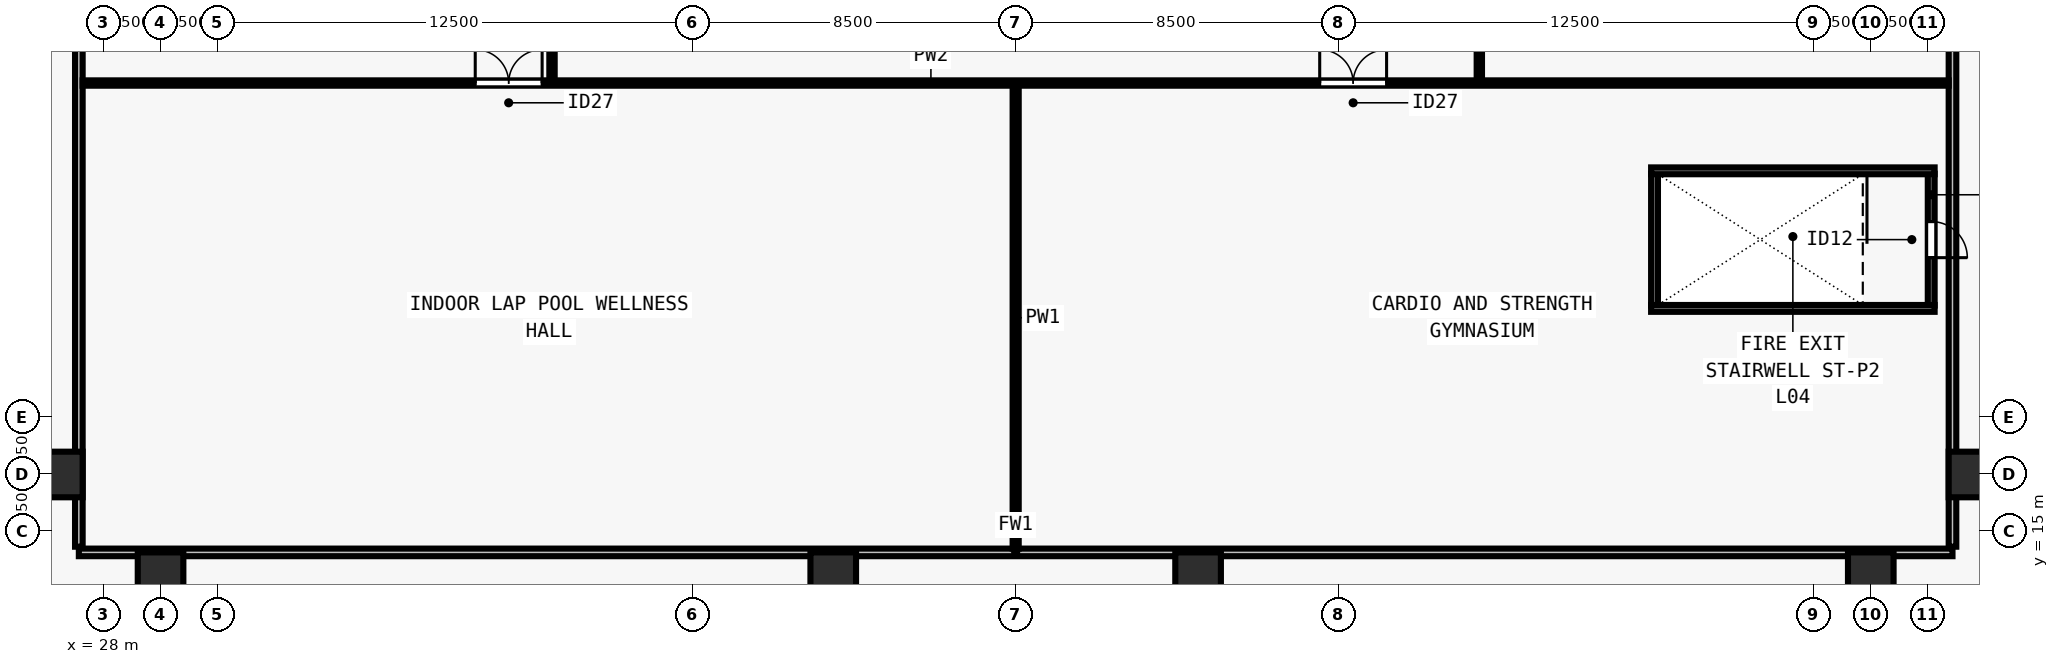
"""IFC4 building model, lengths in metres.
Left out: names, types, materials, properties, quantities, classifications, styles, units other than length and angle.
Written with IfcOpenShell. Run it as: python <this file> out.ifc"""

import sys

from ifc_helpers import new_model, si_unit, direction, frame, frame_2d, origin, origin_2d, place, context, subcontext, project, spatial, rectangle, extrude, element, fill, save


model = new_model("IFC4")
c1 = context("Model", 3, precision=1e-05, world=origin(), true_north=direction((0.0, 1.0)))
c2 = subcontext(c1, "Body", "Model", "MODEL_VIEW")
j1 = project(units=[si_unit("LENGTHUNIT", "METRE"), si_unit("PLANEANGLEUNIT", "RADIAN")], contexts=[c1])
p1 = place(None, origin())
s1 = spatial("IfcSite", under=j1, at=p1, CompositionType="ELEMENT")
p2 = place(p1, origin())
s2 = spatial("IfcBuilding", under=s1, at=p2, CompositionType="ELEMENT")
p3 = place(p2, frame((0.0, 0.0, 19.0)))
s3 = spatial("IfcBuildingStorey", under=s2, at=p3, CompositionType="ELEMENT", Elevation=19.0)
for number, where, z_axis, x_axis in (
    (1, (29.5, 13.85, 0.0), (0.0, 0.0, 1.0), (1.0, 0.0, 0.0)),
    (2, (47.2, 13.85, 0.0), (0.0, 0.0, 1.0), (1.0, 0.0, 0.0)),
    (3, (56.8, 13.85, 0.0), (0.0, 0.0, 1.0), (1.0, 0.0, 0.0)),
    (4, (74.5, 13.85, 0.0), (0.0, 0.0, 1.0), (1.0, 0.0, 0.0)),
    (5, (77.15, 16.5, 0.0), (0.0, 0.0, 1.0), (1.0, 0.0, 0.0)),
    (6, (26.85, 16.5, 0.0), (0.0, 0.0, 1.0), (1.0, 0.0, 0.0)),
):
    element("IfcColumn", number, at=place(p3, frame(where, z_axis=z_axis, x_axis=x_axis)), inside=s3, PredefinedType="COLUMN", context=c2, shape_type="SweptSolid", body=[
        extrude(rectangle(XDim=1.2, YDim=1.2, at=origin_2d()), origin(), (0.0, 0.0, 1.0), 4.5),
    ])
p4 = place(p3, frame((27.35, 14.45, 0.0), z_axis=(0.0, 0.0, 1.0), x_axis=(1.0, 0.0, 0.0)))
e7 = element("IfcWall", 7, at=p4, inside=s3, PredefinedType="SOLIDWALL", context=c2, shape_type="SweptSolid", body=[
    extrude(rectangle(XDim=49.3, YDim=0.2, at=frame_2d((24.65, 0.0))), origin(), (0.0, 0.0, 1.0), 2.455),
])
for number, where, z_axis, x_axis in (
    (8, (27.35, 14.6, 0.0), (0.0, 0.0, 1.0), (0.0, 1.0, 0.0)),
    (9, (76.65, 14.6, 0.0), (0.0, 0.0, 1.0), (0.0, 1.0, 0.0)),
):
    element("IfcWall", number, at=place(p3, frame(where, z_axis=z_axis, x_axis=x_axis)), inside=s3, PredefinedType="SOLIDWALL", context=c2, shape_type="SweptSolid", body=[
        extrude(rectangle(XDim=48.8, YDim=0.2, at=frame_2d((24.4, 0.0))), origin(), (0.0, 0.0, 1.0), 2.455),
    ])
p5 = place(p3, frame((27.45, 26.8, 0.0), z_axis=(0.0, 0.0, 1.0), x_axis=(1.0, 0.0, 0.0)))
e10 = element("IfcWall", 10, at=p5, inside=s3, PredefinedType="PARTITIONING", context=c2, shape_type="SweptSolid", body=[
    extrude(rectangle(XDim=49.1, YDim=0.14, at=frame_2d((24.55, 0.0))), origin(), (0.0, 0.0, 1.0), 3.798),
])
p6 = place(p5, frame((10.33, 0.0, 0.0)))
e11 = element("IfcOpeningElement", 11, at=p6, cuts=e10, PredefinedType="OPENING", context=c2, shape_type="SweptSolid", body=[
    extrude(rectangle(XDim=1.76, YDim=2.2, at=frame_2d((0.88, 1.1))), frame((0.0, 0.08, 0.0), z_axis=(0.0, -1.0, 0.0), x_axis=(1.0, 0.0, 0.0)), (0.0, 0.0, 1.0), 0.16),
])
p7 = place(p5, frame((32.55, 0.0, 0.0)))
e12 = element("IfcOpeningElement", 12, at=p7, cuts=e10, PredefinedType="OPENING", context=c2, shape_type="SweptSolid", body=[
    extrude(rectangle(XDim=1.76, YDim=2.2, at=frame_2d((0.88, 1.1))), frame((0.0, 0.08, 0.0), z_axis=(0.0, -1.0, 0.0), x_axis=(1.0, 0.0, 0.0)), (0.0, 0.0, 1.0), 0.16),
])
p8 = place(p3, frame((39.8, 26.855, 0.0), z_axis=(0.0, 0.0, 1.0), x_axis=(0.0, 1.0, 0.0)))
e13 = element("IfcWall", 13, at=p8, inside=s3, PredefinedType="PARTITIONING", context=c2, shape_type="SweptSolid", body=[
    extrude(rectangle(XDim=24.29, YDim=0.14, at=frame_2d((12.145, 0.0))), origin(), (0.0, 0.0, 1.0), 4.28),
])
p9 = place(p8, frame((10.945, 0.0, 0.0)))
e14 = element("IfcOpeningElement", 14, at=p9, cuts=e13, PredefinedType="OPENING", context=c2, shape_type="SweptSolid", body=[
    extrude(rectangle(XDim=1.76, YDim=2.2, at=frame_2d((0.88, 1.1))), frame((0.0, 0.08, 0.0), z_axis=(0.0, -1.0, 0.0), x_axis=(1.0, 0.0, 0.0)), (0.0, 0.0, 1.0), 0.16),
])
p10 = place(p3, frame((64.2, 26.855, 0.0), z_axis=(0.0, 0.0, 1.0), x_axis=(0.0, 1.0, 0.0)))
e15 = element("IfcWall", 15, at=p10, inside=s3, PredefinedType="PARTITIONING", context=c2, shape_type="SweptSolid", body=[
    extrude(rectangle(XDim=24.29, YDim=0.14, at=frame_2d((12.145, 0.0))), origin(), (0.0, 0.0, 1.0), 4.28),
])
p11 = place(p10, frame((10.945, 0.0, 0.0)))
e16 = element("IfcOpeningElement", 16, at=p11, cuts=e15, PredefinedType="OPENING", context=c2, shape_type="SweptSolid", body=[
    extrude(rectangle(XDim=1.76, YDim=2.2, at=frame_2d((0.88, 1.1))), frame((0.0, 0.08, 0.0), z_axis=(0.0, -1.0, 0.0), x_axis=(1.0, 0.0, 0.0)), (0.0, 0.0, 1.0), 0.16),
])
p12 = place(p3, frame((52.0, 14.55, 0.0), z_axis=(0.0, 0.0, 1.0), x_axis=(0.0, 1.0, 0.0)))
e17 = element("IfcWall", 17, at=p12, inside=s3, PredefinedType="PARTITIONING", context=c2, shape_type="SweptSolid", body=[
    extrude(rectangle(XDim=12.15, YDim=0.16, at=frame_2d((6.075, 0.0))), origin(), (0.0, 0.0, 1.0), 4.28),
])
p13 = place(p3, frame((76.09, 24.415, 0.0), z_axis=(0.0, 0.0, 1.0), x_axis=(0.0, -1.0, 0.0)))
e18 = element("IfcWall", 18, at=p13, inside=s3, PredefinedType="SOLIDWALL", context=c2, shape_type="SweptSolid", body=[
    extrude(rectangle(XDim=3.47, YDim=0.18, at=frame_2d((1.735, 0.0))), origin(), (0.0, 0.0, 1.0), 4.28),
])
p14 = place(p13, frame((1.26, 0.0, 0.0)))
e19 = element("IfcOpeningElement", 19, at=p14, cuts=e18, PredefinedType="OPENING", context=c2, shape_type="SweptSolid", body=[
    extrude(rectangle(XDim=0.95, YDim=2.15, at=frame_2d((0.475, 1.075))), frame((0.0, 0.1, 0.0), z_axis=(0.0, -1.0, 0.0), x_axis=(1.0, 0.0, 0.0)), (0.0, 0.0, 1.0), 0.2),
])
p15 = place(p3, frame((68.81, 24.415, 0.0), z_axis=(0.0, 0.0, 1.0), x_axis=(0.0, -1.0, 0.0)))
e20 = element("IfcWall", 20, at=p15, inside=s3, PredefinedType="SOLIDWALL", context=c2, shape_type="SweptSolid", body=[
    extrude(rectangle(XDim=3.47, YDim=0.18, at=frame_2d((1.735, 0.0))), origin(), (0.0, 0.0, 1.0), 4.28),
])
for number, where, z_axis, x_axis in (
    (21, (76.18, 24.49, 0.0), (0.0, 0.0, 1.0), (-1.0, 0.0, 0.0)),
    (22, (76.18, 20.87, 0.0), (0.0, 0.0, 1.0), (-1.0, 0.0, 0.0)),
):
    element("IfcWall", number, at=place(p3, frame(where, z_axis=z_axis, x_axis=x_axis)), inside=s3, PredefinedType="SOLIDWALL", context=c2, shape_type="SweptSolid", body=[
        extrude(rectangle(XDim=7.46, YDim=0.18, at=frame_2d((3.73, 0.0))), origin(), (0.0, 0.0, 1.0), 4.28),
    ])
p16 = place(p6, origin())
e23 = element("IfcDoor", 23, at=p16, inside=s3, OperationType="DOUBLE_DOOR_SINGLE_SWING", PredefinedType="DOOR", context=c2, shape_type="SweptSolid", body=[
    extrude(rectangle(XDim=1.76, YDim=2.2, at=frame_2d((0.88, 1.1))), frame((0.0, 0.025, 0.0), z_axis=(0.0, -1.0, 0.0), x_axis=(1.0, 0.0, 0.0)), (0.0, 0.0, 1.0), 0.05),
])
fill(e11, e23)
p17 = place(p7, origin())
e24 = element("IfcDoor", 24, at=p17, inside=s3, OperationType="DOUBLE_DOOR_SINGLE_SWING", PredefinedType="DOOR", context=c2, shape_type="SweptSolid", body=[
    extrude(rectangle(XDim=1.76, YDim=2.2, at=frame_2d((0.88, 1.1))), frame((0.0, 0.025, 0.0), z_axis=(0.0, -1.0, 0.0), x_axis=(1.0, 0.0, 0.0)), (0.0, 0.0, 1.0), 0.05),
])
fill(e12, e24)
p18 = place(p14, origin())
e25 = element("IfcDoor", 25, at=p18, inside=s3, OperationType="SINGLE_SWING_RIGHT", PredefinedType="DOOR", context=c2, shape_type="SweptSolid", body=[
    extrude(rectangle(XDim=0.95, YDim=2.15, at=frame_2d((0.475, 1.075))), frame((0.0, 0.025, 0.0), z_axis=(0.0, -1.0, 0.0), x_axis=(1.0, 0.0, 0.0)), (0.0, 0.0, 1.0), 0.05),
])
fill(e19, e25)
save(model, sys.argv[1])
